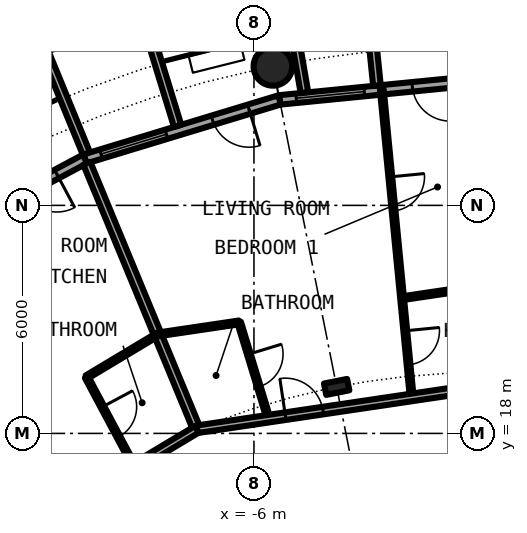
"""IFC4 building model, lengths in metres.
Left out: names, types, materials, properties, quantities, classifications, styles, units other than length and angle.
Written with IfcOpenShell. Run it as: python <this file> out.ifc"""

import sys

from ifc_helpers import new_model, si_unit, direction, frame, frame_2d, origin, origin_2d, place, context, subcontext, project, spatial, rectangle, circle, hollow_circle, i_section, extrude, element, fill, save


model = new_model("IFC4")
c1 = context("Model", 3, precision=1e-05, world=origin(), true_north=direction((0.0, 1.0)))
c2 = subcontext(c1, "Body", "Model", "MODEL_VIEW")
j1 = project(units=[si_unit("LENGTHUNIT", "METRE"), si_unit("PLANEANGLEUNIT", "RADIAN")], contexts=[c1])
p1 = place(None, origin())
s1 = spatial("IfcSite", under=j1, at=p1, CompositionType="ELEMENT")
p2 = place(p1, origin())
s2 = spatial("IfcBuilding", under=s1, at=p2, CompositionType="ELEMENT")
p3 = place(p2, frame((0.0, 0.0, 31.95)))
s3 = spatial("IfcBuildingStorey", under=s2, at=p3, CompositionType="ELEMENT", Elevation=31.95)
p4 = place(p3, frame((-5.501, 27.658, 0.0), z_axis=(0.0, 0.0, 1.0), x_axis=(1.0, 0.0, 0.0)))
e1 = element("IfcColumn", 1, at=p4, inside=s3, PredefinedType="COLUMN", context=c2, shape_type="SweptSolid", body=[
    extrude(hollow_circle(Radius=0.508, WallThickness=0.05, at=origin_2d()), origin(), (0.0, 0.0, 1.0), 3.05),
])
p5 = place(p3, frame((-3.824, 19.223, 0.0), z_axis=(0.0, 0.0, 1.0), x_axis=(-0.195090322016, 0.980785280403, 0.0)))
e2 = element("IfcColumn", 2, at=p5, inside=s3, PredefinedType="COLUMN", context=c2, shape_type="SweptSolid", body=[
    extrude(i_section(OverallWidth=0.305, OverallDepth=0.62, WebThickness=0.021, FlangeThickness=0.04, FilletRadius=0.027, at=origin_2d()), origin(), (0.0, 0.0, 1.0), 3.05),
])
p6 = place(p3, frame((0.0, 27.3, 0.0), z_axis=(0.0, 0.0, 1.0), x_axis=(-0.995173996315, -0.098126026407, 0.0)))
e3 = element("IfcWall", 3, at=p6, inside=s3, PredefinedType="SOLIDWALL", context=c2, shape_type="SweptSolid", body=[
    extrude(rectangle(XDim=5.352, YDim=0.25, at=frame_2d((2.676, 0.0))), origin(), (0.0, 0.0, 1.0), 2.7),
])
p7 = place(p6, frame((0.841, 0.0, 0.0)))
e4 = element("IfcOpeningElement", 4, at=p7, cuts=e3, PredefinedType="OPENING", context=c2, shape_type="SweptSolid", body=[
    extrude(rectangle(XDim=1.0, YDim=2.2, at=frame_2d((0.5, 1.1))), frame((0.0, 0.135, 0.0), z_axis=(0.0, -1.0, 0.0), x_axis=(1.0, 0.0, 0.0)), (0.0, 0.0, 1.0), 0.27),
])
p8 = place(p6, frame((3.111, 0.0, 0.3)))
e5 = element("IfcOpeningElement", 5, at=p8, cuts=e3, PredefinedType="OPENING", context=c2, shape_type="SweptSolid", body=[
    extrude(rectangle(XDim=1.8, YDim=2.1, at=frame_2d((0.9, 1.05))), frame((0.0, 0.135, 0.0), z_axis=(0.0, -1.0, 0.0), x_axis=(1.0, 0.0, 0.0)), (0.0, 0.0, 1.0), 0.27),
])
p9 = place(p3, frame((-2.764, 27.153, -0.03), z_axis=(0.0, 0.0, 1.0), x_axis=(-0.101505487237, 0.994834979311, 0.0)))
e6 = element("IfcWall", 6, at=p9, inside=s3, PredefinedType="SOLIDWALL", context=c2, shape_type="SweptSolid", body=[
    extrude(rectangle(XDim=3.007, YDim=0.2, at=frame_2d((1.503, 0.0))), origin(), (0.0, 0.0, 1.0), 2.73),
])
p10 = place(p3, frame((-4.671, 26.966, -0.03), z_axis=(0.0, 0.0, 1.0), x_axis=(-0.170539878907, 0.985350774954, 0.0)))
e7 = element("IfcWall", 7, at=p10, inside=s3, PredefinedType="SOLIDWALL", context=c2, shape_type="SweptSolid", body=[
    extrude(rectangle(XDim=2.932, YDim=0.2, at=frame_2d((1.466, 0.0))), origin(), (0.0, 0.0, 1.0), 2.73),
])
p11 = place(p3, frame((-5.326, 26.775, 0.0), z_axis=(0.0, 0.0, 1.0), x_axis=(-0.956965678721, -0.290201119486, 0.0)))
e8 = element("IfcWall", 8, at=p11, inside=s3, PredefinedType="SOLIDWALL", context=c2, shape_type="SweptSolid", body=[
    extrude(rectangle(XDim=5.351, YDim=0.25, at=frame_2d((2.676, 0.0))), origin(), (0.0, 0.0, 1.0), 2.7),
])
p12 = place(p11, frame((0.841, 0.0, 0.0)))
e9 = element("IfcOpeningElement", 9, at=p12, cuts=e8, PredefinedType="OPENING", context=c2, shape_type="SweptSolid", body=[
    extrude(rectangle(XDim=1.0, YDim=2.2, at=frame_2d((0.5, 1.1))), frame((0.0, 0.135, 0.0), z_axis=(0.0, -1.0, 0.0), x_axis=(1.0, 0.0, 0.0)), (0.0, 0.0, 1.0), 0.27),
])
p13 = place(p11, frame((3.111, 0.0, 0.3)))
e10 = element("IfcOpeningElement", 10, at=p13, cuts=e8, PredefinedType="OPENING", context=c2, shape_type="SweptSolid", body=[
    extrude(rectangle(XDim=1.8, YDim=2.1, at=frame_2d((0.9, 1.05))), frame((0.0, 0.135, 0.0), z_axis=(0.0, -1.0, 0.0), x_axis=(1.0, 0.0, 0.0)), (0.0, 0.0, 1.0), 0.27),
])
p14 = place(p3, frame((-8.82, 29.093, -0.03), z_axis=(0.0, 0.0, 1.0), x_axis=(-0.941461077774, -0.337121697664, 0.0)))
e11 = element("IfcWall", 11, at=p14, inside=s3, PredefinedType="SOLIDWALL", context=c2, shape_type="SweptSolid", body=[
    extrude(rectangle(XDim=2.993, YDim=0.2, at=frame_2d((1.497, 0.0))), origin(), (0.0, 0.0, 1.0), 2.73),
])
p15 = place(p14, frame((0.457, 0.0, 0.33)))
e12 = element("IfcOpeningElement", 12, at=p15, cuts=e11, PredefinedType="OPENING", context=c2, shape_type="SweptSolid", body=[
    extrude(circle(Radius=1.04, at=frame_2d((1.04, 1.04))), frame((0.0, 0.11, 0.0), z_axis=(0.0, -1.0, 0.0), x_axis=(1.0, 0.0, 0.0)), (0.0, 0.0, 1.0), 0.22),
])
p16 = place(p3, frame((-8.009, 26.092, -0.03), z_axis=(0.0, 0.0, 1.0), x_axis=(-0.293406695073, 0.955987715029, 0.0)))
e13 = element("IfcWall", 13, at=p16, inside=s3, PredefinedType="SOLIDWALL", context=c2, shape_type="SweptSolid", body=[
    extrude(rectangle(XDim=3.006, YDim=0.2, at=frame_2d((1.503, 0.0))), origin(), (0.0, 0.0, 1.0), 2.73),
])
p17 = place(p3, frame((-10.409, 25.364, -0.03), z_axis=(0.0, 0.0, 1.0), x_axis=(-0.379509886562, 0.925187681501, 0.0)))
e14 = element("IfcWall", 14, at=p17, inside=s3, PredefinedType="SOLIDWALL", context=c2, shape_type="SweptSolid", body=[
    extrude(rectangle(XDim=2.883, YDim=0.2, at=frame_2d((1.441, 0.0))), origin(), (0.0, 0.0, 1.0), 2.73),
])
p18 = place(p3, frame((-10.447, 25.222, 0.0), z_axis=(0.0, 0.0, 1.0), x_axis=(-0.881915646801, -0.471407246368, 0.0)))
e15 = element("IfcWall", 15, at=p18, inside=s3, PredefinedType="SOLIDWALL", context=c2, shape_type="SweptSolid", body=[
    extrude(rectangle(XDim=5.352, YDim=0.25, at=frame_2d((2.676, 0.0))), origin(), (0.0, 0.0, 1.0), 2.7),
])
p19 = place(p18, frame((0.841, 0.0, 0.0)))
e16 = element("IfcOpeningElement", 16, at=p19, cuts=e15, PredefinedType="OPENING", context=c2, shape_type="SweptSolid", body=[
    extrude(rectangle(XDim=1.0, YDim=2.2, at=frame_2d((0.5, 1.1))), frame((0.0, 0.135, 0.0), z_axis=(0.0, -1.0, 0.0), x_axis=(1.0, 0.0, 0.0)), (0.0, 0.0, 1.0), 0.27),
])
p20 = place(p18, frame((3.111, 0.0, 0.3)))
e17 = element("IfcOpeningElement", 17, at=p20, cuts=e15, PredefinedType="OPENING", context=c2, shape_type="SweptSolid", body=[
    extrude(rectangle(XDim=1.8, YDim=2.1, at=frame_2d((0.9, 1.05))), frame((0.0, 0.135, 0.0), z_axis=(0.0, -1.0, 0.0), x_axis=(1.0, 0.0, 0.0)), (0.0, 0.0, 1.0), 0.27),
])
p21 = place(p3, frame((-10.405, 19.481, 0.0), z_axis=(0.0, 0.0, 1.0), x_axis=(0.471151994359, -0.882052038267, 0.0)))
e18 = element("IfcWall", 18, at=p21, inside=s3, PredefinedType="PARTITIONING", context=c2, shape_type="SweptSolid", body=[
    extrude(rectangle(XDim=2.674, YDim=0.1, at=frame_2d((1.337, 0.0))), origin(), (0.0, 0.0, 1.0), 2.7),
])
p22 = place(p21, frame((0.887, 0.0, 0.0)))
e19 = element("IfcOpeningElement", 19, at=p22, cuts=e18, PredefinedType="OPENING", context=c2, shape_type="SweptSolid", body=[
    extrude(rectangle(XDim=0.9, YDim=2.3, at=frame_2d((0.45, 1.15))), frame((0.0, 0.06, 0.0), z_axis=(0.0, -1.0, 0.0), x_axis=(1.0, 0.0, 0.0)), (0.0, 0.0, 1.0), 0.12),
])
p23 = place(p3, frame((-10.398, 25.106, 0.0), z_axis=(0.0, 0.0, 1.0), x_axis=(0.382490346157, -0.923959487801, 0.0)))
e20 = element("IfcWall", 20, at=p23, inside=s3, PredefinedType="PARTITIONING", context=c2, shape_type="SweptSolid", body=[
    extrude(rectangle(XDim=7.574, YDim=0.2, at=frame_2d((3.787, 0.0))), origin(), (0.0, 0.0, 1.0), 2.7),
])
p24 = place(p3, frame((-6.39, 20.921, 0.0), z_axis=(0.0, 0.0, 1.0), x_axis=(0.292206826201, -0.956355148845, 0.0)))
e21 = element("IfcWall", 21, at=p24, inside=s3, PredefinedType="PARTITIONING", context=c2, shape_type="SweptSolid", body=[
    extrude(rectangle(XDim=2.648, YDim=0.1, at=frame_2d((1.324, 0.0))), origin(), (0.0, 0.0, 1.0), 2.7),
])
p25 = place(p24, frame((0.874, 0.0, 0.0)))
e22 = element("IfcOpeningElement", 22, at=p25, cuts=e21, PredefinedType="OPENING", context=c2, shape_type="SweptSolid", body=[
    extrude(rectangle(XDim=0.9, YDim=2.3, at=frame_2d((0.45, 1.15))), frame((0.0, 0.06, 0.0), z_axis=(0.0, -1.0, 0.0), x_axis=(1.0, 0.0, 0.0)), (0.0, 0.0, 1.0), 0.12),
])
p26 = place(p3, frame((-2.636, 27.047, 0.0), z_axis=(0.0, 0.0, 1.0), x_axis=(0.096836141099, -0.995300337475, 0.0)))
e23 = element("IfcWall", 23, at=p26, inside=s3, PredefinedType="PARTITIONING", context=c2, shape_type="SweptSolid", body=[
    extrude(rectangle(XDim=8.138, YDim=0.1, at=frame_2d((4.069, 0.0))), origin(), (0.0, 0.0, 1.0), 2.7),
])
p27 = place(p26, frame((6.377, 0.0, 0.0)))
e24 = element("IfcOpeningElement", 24, at=p27, cuts=e23, PredefinedType="OPENING", context=c2, shape_type="SweptSolid", body=[
    extrude(rectangle(XDim=0.9, YDim=2.3, at=frame_2d((0.45, 1.15))), frame((0.0, 0.06, 0.0), z_axis=(0.0, -1.0, 0.0), x_axis=(1.0, 0.0, 0.0)), (0.0, 0.0, 1.0), 0.12),
])
p28 = place(p26, frame((2.308, 0.0, 0.0)))
e25 = element("IfcOpeningElement", 25, at=p28, cuts=e23, PredefinedType="OPENING", context=c2, shape_type="SweptSolid", body=[
    extrude(rectangle(XDim=0.9, YDim=2.3, at=frame_2d((0.45, 1.15))), frame((0.0, 0.06, 0.0), z_axis=(0.0, -1.0, 0.0), x_axis=(1.0, 0.0, 0.0)), (0.0, 0.0, 1.0), 0.12),
])
p29 = place(p3, frame((-7.501, 18.108, 0.0), z_axis=(0.0, 0.0, 1.0), x_axis=(0.989167514259, 0.146791105777, 0.0)))
e26 = element("IfcWall", 26, at=p29, inside=s3, PredefinedType="PARTITIONING", context=c2, shape_type="SweptSolid", body=[
    extrude(rectangle(XDim=9.525, YDim=0.2, at=frame_2d((4.763, 0.0))), origin(), (0.0, 0.0, 1.0), 2.38),
])
p30 = place(p29, frame((2.355, 0.0, 0.0)))
e27 = element("IfcOpeningElement", 27, at=p30, cuts=e26, PredefinedType="OPENING", context=c2, shape_type="SweptSolid", body=[
    extrude(rectangle(XDim=1.0, YDim=2.3, at=frame_2d((0.5, 1.15))), frame((0.0, 0.11, 0.0), z_axis=(0.0, -1.0, 0.0), x_axis=(1.0, 0.0, 0.0)), (0.0, 0.0, 1.0), 0.22),
])
p31 = place(p3, frame((-10.653, 16.218, 0.0), z_axis=(0.0, 0.0, 1.0), x_axis=(0.857656999296, 0.514222200569, 0.0)))
e28 = element("IfcWall", 28, at=p31, inside=s3, PredefinedType="PARTITIONING", context=c2, shape_type="SweptSolid", body=[
    extrude(rectangle(XDim=3.675, YDim=0.2, at=frame_2d((1.838, 0.0))), origin(), (0.0, 0.0, 1.0), 2.38),
])
p32 = place(p3, frame((-8.534, 20.603, 0.0), z_axis=(0.0, 0.0, 1.0), x_axis=(0.989187732684, 0.14665479708, 0.0)))
e29 = element("IfcWall", 29, at=p32, inside=s3, PredefinedType="PARTITIONING", context=c2, shape_type="SweptSolid", body=[
    extrude(rectangle(XDim=2.167, YDim=0.1, at=frame_2d((1.084, 0.0))), origin(), (0.0, 0.0, 1.0), 2.7),
])
p33 = place(p3, frame((-2.102, 21.557, 0.0), z_axis=(0.0, 0.0, 1.0), x_axis=(0.989171386505, 0.146765009863, 0.0)))
e30 = element("IfcWall", 30, at=p33, inside=s3, PredefinedType="PARTITIONING", context=c2, shape_type="SweptSolid", body=[
    extrude(rectangle(XDim=4.335, YDim=0.1, at=frame_2d((2.167, 0.0))), origin(), (0.0, 0.0, 1.0), 2.7),
])
p34 = place(p3, frame((-10.405, 19.481, 0.0), z_axis=(0.0, 0.0, 1.0), x_axis=(0.857611386679, 0.514298268943, 0.0)))
e31 = element("IfcWall", 31, at=p34, inside=s3, PredefinedType="PARTITIONING", context=c2, shape_type="SweptSolid", body=[
    extrude(rectangle(XDim=2.182, YDim=0.1, at=frame_2d((1.091, 0.0))), origin(), (0.0, 0.0, 1.0), 2.7),
])
p35 = place(p7, origin())
e32 = element("IfcDoor", 32, at=p35, inside=s3, OperationType="SINGLE_SWING_LEFT", PredefinedType="DOOR", context=c2, shape_type="SweptSolid", body=[
    extrude(rectangle(XDim=1.0, YDim=2.2, at=frame_2d((0.5, 1.1))), frame((0.0, 0.025, 0.0), z_axis=(0.0, -1.0, 0.0), x_axis=(1.0, 0.0, 0.0)), (0.0, 0.0, 1.0), 0.05),
])
fill(e4, e32)
p36 = place(p8, origin())
e33 = element("IfcWindow", 33, at=p36, inside=s3, PartitioningType="SINGLE_PANEL", PredefinedType="WINDOW", context=c2, shape_type="SweptSolid", body=[
    extrude(rectangle(XDim=1.8, YDim=2.1, at=frame_2d((0.9, 1.05))), frame((0.0, 0.03, 0.0), z_axis=(0.0, -1.0, 0.0), x_axis=(1.0, 0.0, 0.0)), (0.0, 0.0, 1.0), 0.06),
])
fill(e5, e33)
p37 = place(p12, origin())
e34 = element("IfcDoor", 34, at=p37, inside=s3, OperationType="SINGLE_SWING_LEFT", PredefinedType="DOOR", context=c2, shape_type="SweptSolid", body=[
    extrude(rectangle(XDim=1.0, YDim=2.2, at=frame_2d((0.5, 1.1))), frame((0.0, 0.025, 0.0), z_axis=(0.0, -1.0, 0.0), x_axis=(1.0, 0.0, 0.0)), (0.0, 0.0, 1.0), 0.05),
])
fill(e9, e34)
p38 = place(p13, origin())
e35 = element("IfcWindow", 35, at=p38, inside=s3, PartitioningType="SINGLE_PANEL", PredefinedType="WINDOW", context=c2, shape_type="SweptSolid", body=[
    extrude(rectangle(XDim=1.8, YDim=2.1, at=frame_2d((0.9, 1.05))), frame((0.0, 0.03, 0.0), z_axis=(0.0, -1.0, 0.0), x_axis=(1.0, 0.0, 0.0)), (0.0, 0.0, 1.0), 0.06),
])
fill(e10, e35)
p39 = place(p19, origin())
e36 = element("IfcDoor", 36, at=p39, inside=s3, OperationType="SINGLE_SWING_LEFT", PredefinedType="DOOR", context=c2, shape_type="SweptSolid", body=[
    extrude(rectangle(XDim=1.0, YDim=2.2, at=frame_2d((0.5, 1.1))), frame((0.0, 0.025, 0.0), z_axis=(0.0, -1.0, 0.0), x_axis=(1.0, 0.0, 0.0)), (0.0, 0.0, 1.0), 0.05),
])
fill(e16, e36)
p40 = place(p30, origin())
e37 = element("IfcDoor", 37, at=p40, inside=s3, OperationType="SINGLE_SWING_LEFT", PredefinedType="DOOR", context=c2, shape_type="SweptSolid", body=[
    extrude(rectangle(XDim=1.0, YDim=2.3, at=frame_2d((0.5, 1.15))), frame((0.0, 0.025, 0.0), z_axis=(0.0, -1.0, 0.0), x_axis=(1.0, 0.0, 0.0)), (0.0, 0.0, 1.0), 0.05),
])
fill(e27, e37)
p41 = place(p25, origin())
e38 = element("IfcDoor", 38, at=p41, inside=s3, OperationType="SINGLE_SWING_LEFT", PredefinedType="DOOR", context=c2, shape_type="SweptSolid", body=[
    extrude(rectangle(XDim=0.9, YDim=2.3, at=frame_2d((0.45, 1.15))), frame((0.0, 0.025, 0.0), z_axis=(0.0, -1.0, 0.0), x_axis=(1.0, 0.0, 0.0)), (0.0, 0.0, 1.0), 0.05),
])
fill(e22, e38)
p42 = place(p27, origin())
e39 = element("IfcDoor", 39, at=p42, inside=s3, OperationType="SINGLE_SWING_RIGHT", PredefinedType="DOOR", context=c2, shape_type="SweptSolid", body=[
    extrude(rectangle(XDim=0.9, YDim=2.3, at=frame_2d((0.45, 1.15))), frame((0.0, 0.025, 0.0), z_axis=(0.0, -1.0, 0.0), x_axis=(1.0, 0.0, 0.0)), (0.0, 0.0, 1.0), 0.05),
])
fill(e24, e39)
p43 = place(p28, origin())
e40 = element("IfcDoor", 40, at=p43, inside=s3, OperationType="SINGLE_SWING_LEFT", PredefinedType="DOOR", context=c2, shape_type="SweptSolid", body=[
    extrude(rectangle(XDim=0.9, YDim=2.3, at=frame_2d((0.45, 1.15))), frame((0.0, 0.025, 0.0), z_axis=(0.0, -1.0, 0.0), x_axis=(1.0, 0.0, 0.0)), (0.0, 0.0, 1.0), 0.05),
])
fill(e25, e40)
p44 = place(p22, origin())
e41 = element("IfcDoor", 41, at=p44, inside=s3, OperationType="SINGLE_SWING_LEFT", PredefinedType="DOOR", context=c2, shape_type="SweptSolid", body=[
    extrude(rectangle(XDim=0.9, YDim=2.3, at=frame_2d((0.45, 1.15))), frame((0.0, 0.025, 0.0), z_axis=(0.0, -1.0, 0.0), x_axis=(1.0, 0.0, 0.0)), (0.0, 0.0, 1.0), 0.05),
])
fill(e19, e41)
save(model, sys.argv[1])
